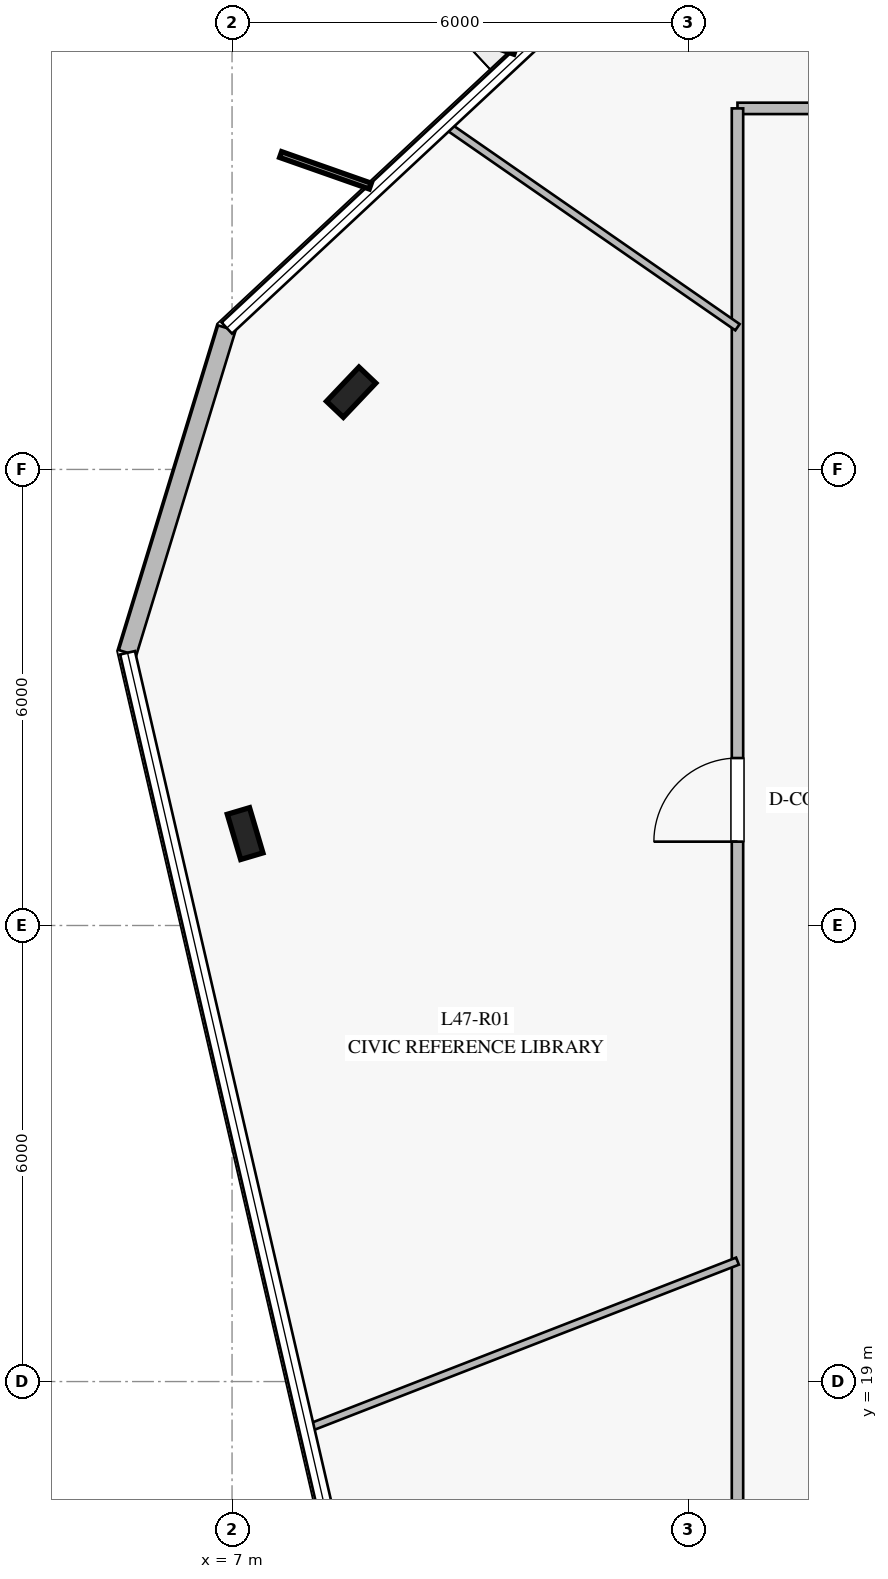
"""IFC4 building model, lengths in metres.
Left out: names, types, materials, properties, quantities, classifications, styles, units other than length and angle.
Written with IfcOpenShell. Run it as: python <this file> out.ifc"""

import sys

from ifc_helpers import new_model, si_unit, direction, frame, frame_2d, origin, origin_2d, place, context, subcontext, project, spatial, rectangle, i_section, extrude, element, fill, save


model = new_model("IFC4")
c1 = context("Model", 3, precision=1e-05, world=origin(), true_north=direction((0.0, 1.0)))
c2 = subcontext(c1, "Body", "Model", "MODEL_VIEW")
j1 = project(units=[si_unit("LENGTHUNIT", "METRE"), si_unit("PLANEANGLEUNIT", "RADIAN")], contexts=[c1])
p1 = place(None, origin())
s1 = spatial("IfcSite", under=j1, at=p1, CompositionType="ELEMENT")
p2 = place(p1, origin())
s2 = spatial("IfcBuilding", under=s1, at=p2, CompositionType="ELEMENT")
p3 = place(p2, frame((0.0, 0.0, 196.8)))
s3 = spatial("IfcBuildingStorey", under=s2, at=p3, CompositionType="ELEMENT", Elevation=196.8)
for number, where, z_axis, x_axis in (
    (1, (8.567, 32.016, 0.0), (0.0, 0.0, 1.0), (0.688, 0.725, 0.0)),
    (2, (7.172, 26.209, 0.0), (0.0, 0.0, 1.0), (-0.284, 0.959, 0.0)),
):
    element("IfcColumn", number, at=place(p3, frame(where, z_axis=z_axis, x_axis=x_axis)), inside=s3, PredefinedType="COLUMN", context=c2, shape_type="SweptSolid", body=[
        extrude(i_section(OverallWidth=0.305, OverallDepth=0.62, WebThickness=0.021, FlangeThickness=0.04, at=origin_2d()), origin(), (0.0, 0.0, 1.0), 4.0),
    ])
p4 = place(p3, frame((6.931, 32.86, 0.0), z_axis=(0.0, 0.0, 1.0), x_axis=(-0.29232266577, -0.956319747301, 0.0)))
e3 = element("IfcWall", 3, at=p4, inside=s3, PredefinedType="STANDARD", context=c2, shape_type="SweptSolid", body=[
    extrude(rectangle(XDim=4.467, YDim=0.24, at=frame_2d((2.234, 0.0))), origin(), (0.0, 0.0, 1.0), 3.78),
])
p5 = place(p3, frame((13.65, 35.75, 0.0), z_axis=(0.0, 0.0, 1.0), x_axis=(1.0, 0.0, 0.0)))
e4 = element("IfcWall", 4, at=p5, inside=s3, PredefinedType="PARTITIONING", context=c2, shape_type="SweptSolid", body=[
    extrude(rectangle(XDim=22.7, YDim=0.15, at=frame_2d((11.35, 0.0))), origin(), (0.0, 0.0, 1.0), 3.02),
])
p6 = place(p5, frame((14.901, 0.0, 0.0)))
e5 = element("IfcOpeningElement", 5, at=p6, cuts=e4, PredefinedType="OPENING", context=c2, shape_type="SweptSolid", body=[
    extrude(rectangle(XDim=1.1, YDim=2.2, at=frame_2d((0.55, 1.1))), frame((0.0, 0.085, 0.0), z_axis=(0.0, -1.0, 0.0), x_axis=(1.0, 0.0, 0.0)), (0.0, 0.0, 1.0), 0.17),
])
p7 = place(p5, frame((4.604, 0.0, 0.0)))
e6 = element("IfcOpeningElement", 6, at=p7, cuts=e4, PredefinedType="OPENING", context=c2, shape_type="SweptSolid", body=[
    extrude(rectangle(XDim=1.1, YDim=2.2, at=frame_2d((0.55, 1.1))), frame((0.0, 0.085, 0.0), z_axis=(0.0, -1.0, 0.0), x_axis=(1.0, 0.0, 0.0)), (0.0, 0.0, 1.0), 0.17),
])
p8 = place(p3, frame((13.65, 14.25, 0.0), z_axis=(0.0, 0.0, 1.0), x_axis=(0.0, 1.0, 0.0)))
e7 = element("IfcWall", 7, at=p8, inside=s3, PredefinedType="PARTITIONING", context=c2, shape_type="SweptSolid", body=[
    extrude(rectangle(XDim=21.5, YDim=0.15, at=frame_2d((10.75, 0.0))), origin(), (0.0, 0.0, 1.0), 3.05),
])
p9 = place(p8, frame((11.853, 0.0, 0.0)))
e8 = element("IfcOpeningElement", 8, at=p9, cuts=e7, PredefinedType="OPENING", context=c2, shape_type="SweptSolid", body=[
    extrude(rectangle(XDim=1.1, YDim=2.2, at=frame_2d((0.55, 1.1))), frame((0.0, 0.085, 0.0), z_axis=(0.0, -1.0, 0.0), x_axis=(1.0, 0.0, 0.0)), (0.0, 0.0, 1.0), 0.17),
])
p10 = place(p3, frame((13.65, 32.871, 0.0), z_axis=(0.0, 0.0, 1.0), x_axis=(-0.821756681919, 0.569838534781, 0.0)))
e9 = element("IfcWall", 9, at=p10, inside=s3, PredefinedType="MOVABLE", context=c2, shape_type="SweptSolid", body=[
    extrude(rectangle(XDim=4.664, YDim=0.1, at=frame_2d((2.332, 0.0))), origin(), (0.0, 0.0, 1.0), 3.05),
])
p11 = place(p3, frame((13.65, 20.584, 0.0), z_axis=(0.0, 0.0, 1.0), x_axis=(-0.931968408731, -0.362539494577, 0.0)))
e10 = element("IfcWall", 10, at=p11, inside=s3, PredefinedType="MOVABLE", context=c2, shape_type="SweptSolid", body=[
    extrude(rectangle(XDim=6.065, YDim=0.1, at=frame_2d((3.033, 0.0))), origin(), (0.0, 0.0, 1.0), 3.18),
])
p12 = place(p9, origin())
e11 = element("IfcDoor", 11, at=p12, inside=s3, OperationType="SINGLE_SWING_LEFT", PredefinedType="DOOR", context=c2, shape_type="SweptSolid", body=[
    extrude(rectangle(XDim=1.1, YDim=2.2, at=frame_2d((0.55, 1.1))), frame((0.0, 0.025, 0.0), z_axis=(0.0, -1.0, 0.0), x_axis=(1.0, 0.0, 0.0)), (0.0, 0.0, 1.0), 0.05),
])
fill(e8, e11)
save(model, sys.argv[1])
